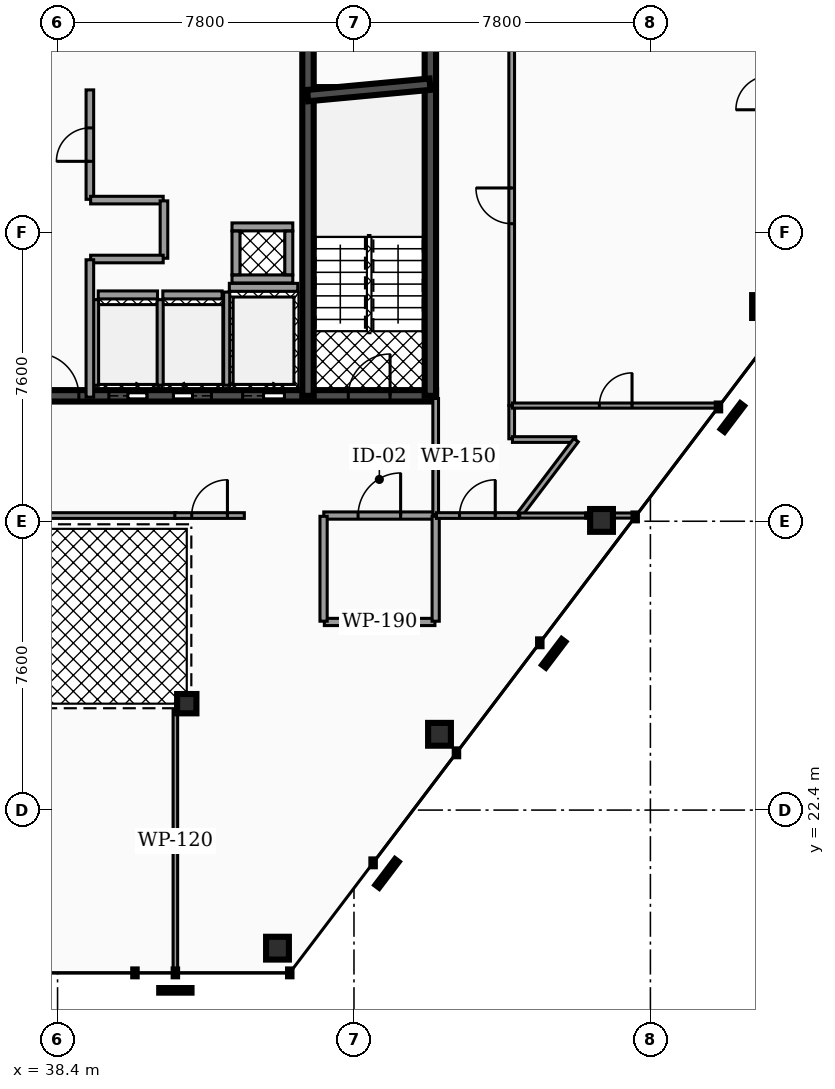
"""IFC4 building model, lengths in metres.
Left out: names, types, materials, properties, quantities, classifications, styles, units other than length and angle.
Written with IfcOpenShell. Run it as: python <this file> out.ifc"""

import sys

from ifc_helpers import new_model, si_unit, direction, frame, frame_2d, origin, origin_2d, place, context, subcontext, project, spatial, rectangle, hollow_rectangle, hollow_circle, extrude, element, fill, save


model = new_model("IFC4")
c1 = context("Model", 3, precision=1e-05, world=origin(), true_north=direction((0.0, 1.0)))
c2 = subcontext(c1, "Body", "Model", "MODEL_VIEW")
j1 = project(units=[si_unit("LENGTHUNIT", "METRE"), si_unit("PLANEANGLEUNIT", "RADIAN")], contexts=[c1])
p1 = place(None, origin())
s1 = spatial("IfcSite", under=j1, at=p1, CompositionType="ELEMENT")
p2 = place(p1, origin())
s2 = spatial("IfcBuilding", under=s1, at=p2, CompositionType="ELEMENT")
p3 = place(p2, frame((0.0, 0.0, 222.36)))
s3 = spatial("IfcBuildingStorey", under=s2, at=p3, CompositionType="ELEMENT", Elevation=222.36)
p4 = place(p3, frame((28.5, 33.3, 0.0), z_axis=(0.0, 0.0, 1.0), x_axis=(1.0, 0.0, 0.0)))
e1 = element("IfcWall", 1, at=p4, inside=s3, PredefinedType="SHEAR", context=c2, shape_type="SweptSolid", body=[
    extrude(rectangle(XDim=19.86, YDim=0.3, at=frame_2d((9.93, 0.0))), origin(), (0.0, 0.0, 1.0), 3.18),
])
p5 = place(p4, frame((3.93, 0.0, 0.0)))
e2 = element("IfcOpeningElement", 2, at=p5, cuts=e1, PredefinedType="OPENING", context=c2, shape_type="SweptSolid", body=[
    extrude(rectangle(XDim=1.1, YDim=2.15, at=frame_2d((0.55, 1.075))), frame((0.0, 0.16, 0.0), z_axis=(0.0, -1.0, 0.0), x_axis=(1.0, 0.0, 0.0)), (0.0, 0.0, 1.0), 0.32),
])
p6 = place(p4, frame((14.77, 0.0, 0.0)))
e3 = element("IfcOpeningElement", 3, at=p6, cuts=e1, PredefinedType="OPENING", context=c2, shape_type="SweptSolid", body=[
    extrude(rectangle(XDim=1.1, YDim=2.15, at=frame_2d((0.55, 1.075))), frame((0.0, 0.16, 0.0), z_axis=(0.0, -1.0, 0.0), x_axis=(1.0, 0.0, 0.0)), (0.0, 0.0, 1.0), 0.32),
])
p7 = place(p4, frame((11.25, 0.0, 0.0)))
e4 = element("IfcOpeningElement", 4, at=p7, cuts=e1, PredefinedType="OPENING", context=c2, shape_type="SweptSolid", body=[
    extrude(rectangle(XDim=1.0, YDim=2.1, at=frame_2d((0.5, 1.05))), frame((0.0, 0.16, 0.0), z_axis=(0.0, -1.0, 0.0), x_axis=(1.0, 0.0, 0.0)), (0.0, 0.0, 1.0), 0.32),
])
p8 = place(p4, frame((12.95, 0.0, 0.0)))
e5 = element("IfcOpeningElement", 5, at=p8, cuts=e1, PredefinedType="OPENING", context=c2, shape_type="SweptSolid", body=[
    extrude(rectangle(XDim=1.0, YDim=2.1, at=frame_2d((0.5, 1.05))), frame((0.0, 0.16, 0.0), z_axis=(0.0, -1.0, 0.0), x_axis=(1.0, 0.0, 0.0)), (0.0, 0.0, 1.0), 0.32),
])
p9 = place(p4, frame((5.85, 0.0, 0.0)))
e6 = element("IfcOpeningElement", 6, at=p9, cuts=e1, PredefinedType="OPENING", context=c2, shape_type="SweptSolid", body=[
    extrude(rectangle(XDim=1.0, YDim=2.1, at=frame_2d((0.5, 1.05))), frame((0.0, 0.16, 0.0), z_axis=(0.0, -1.0, 0.0), x_axis=(1.0, 0.0, 0.0)), (0.0, 0.0, 1.0), 0.32),
])
p10 = place(p4, frame((1.21, 0.0, 0.0)))
e7 = element("IfcOpeningElement", 7, at=p10, cuts=e1, PredefinedType="OPENING", context=c2, shape_type="SweptSolid", body=[
    extrude(rectangle(XDim=1.1, YDim=2.2, at=frame_2d((0.55, 1.1))), frame((0.0, 0.16, 0.0), z_axis=(0.0, -1.0, 0.0), x_axis=(1.0, 0.0, 0.0)), (0.0, 0.0, 1.0), 0.32),
])
p11 = place(p4, frame((9.34, 0.0, 0.0)))
e8 = element("IfcOpeningElement", 8, at=p11, cuts=e1, PredefinedType="OPENING", context=c2, shape_type="SweptSolid", body=[
    extrude(rectangle(XDim=1.12, YDim=2.05, at=frame_2d((0.56, 1.025))), frame((0.0, 0.16, 0.0), z_axis=(0.0, -1.0, 0.0), x_axis=(1.0, 0.0, 0.0)), (0.0, 0.0, 1.0), 0.32),
])
p12 = place(p4, frame((17.55, 0.0, 0.0)))
e9 = element("IfcOpeningElement", 9, at=p12, cuts=e1, PredefinedType="OPENING", context=c2, shape_type="SweptSolid", body=[
    extrude(rectangle(XDim=1.1, YDim=2.2, at=frame_2d((0.55, 1.1))), frame((0.0, 0.16, 0.0), z_axis=(0.0, -1.0, 0.0), x_axis=(1.0, 0.0, 0.0)), (0.0, 0.0, 1.0), 0.32),
])
for number, where, z_axis, x_axis in (
    (10, (44.99, 33.3, 0.0), (0.0, 0.0, 1.0), (0.0, 1.0, 0.0)),
    (11, (48.21, 33.3, 0.0), (0.0, 0.0, 1.0), (0.0, 1.0, 0.0)),
):
    element("IfcWall", number, at=place(p3, frame(where, z_axis=z_axis, x_axis=x_axis)), inside=s3, PredefinedType="SHEAR", context=c2, shape_type="SweptSolid", body=[
        extrude(rectangle(XDim=10.1, YDim=0.3, at=frame_2d((5.05, 0.0))), origin(), (0.0, 0.0, 1.0), 3.18),
    ])
p13 = place(p3, frame((44.98, 41.2, 0.0), z_axis=(0.0, 0.0, 1.0), x_axis=(0.995686468965, 0.09278176286, 0.0)))
e12 = element("IfcWall", 12, at=p13, inside=s3, PredefinedType="SHEAR", context=c2, shape_type="SweptSolid", body=[
    extrude(rectangle(XDim=3.234, YDim=0.3, at=frame_2d((1.617, 0.0))), origin(), (0.0, 0.0, 1.0), 3.18),
])
for number, where, z_axis, x_axis in (
    (13, (44.187, 18.767, 0.0), (0.0, 0.0, 1.0), (1.0, 0.0, 0.0)),
    (14, (48.45, 24.394, 0.0), (0.0, 0.0, 1.0), (1.0, 0.0, 0.0)),
    (15, (52.714, 30.022, 0.0), (0.0, 0.0, 1.0), (1.0, 0.0, 0.0)),
    (16, (56.977, 35.649, 0.0), (0.0, 0.0, 1.0), (1.0, 0.0, 0.0)),
):
    element("IfcColumn", number, at=place(p3, frame(where, z_axis=z_axis, x_axis=x_axis)), inside=s3, PredefinedType="COLUMN", context=c2, shape_type="SweptSolid", body=[
        extrude(hollow_rectangle(XDim=0.6, YDim=0.6, WallThickness=0.03, at=origin_2d()), origin(), (0.0, 0.0, 1.0), 3.18),
    ])
p14 = place(p3, frame((41.8, 25.2, 0.0), z_axis=(0.0, 0.0, 1.0), x_axis=(1.0, 0.0, 0.0)))
e17 = element("IfcColumn", 17, at=p14, inside=s3, PredefinedType="COLUMN", context=c2, shape_type="SweptSolid", body=[
    extrude(hollow_circle(Radius=0.254, WallThickness=0.02, at=origin_2d()), origin(), (0.0, 0.0, 1.0), 3.18),
])
p15 = place(p3, frame((42.92, 36.155, 0.0), z_axis=(0.0, 0.0, 1.0), x_axis=(1.0, 0.0, 0.0)))
e18 = element("IfcWall", 18, at=p15, inside=s3, PredefinedType="SOLIDWALL", context=c2, shape_type="SweptSolid", body=[
    extrude(rectangle(XDim=1.8, YDim=0.21, at=frame_2d((0.9, 0.0))), origin(), (0.0, 0.0, 1.0), 3.18),
])
p16 = place(p3, frame((42.85, 33.58, 0.0), z_axis=(0.0, 0.0, 1.0), x_axis=(0.0, 1.0, 0.0)))
e19 = element("IfcWall", 19, at=p16, inside=s3, PredefinedType="SOLIDWALL", context=c2, shape_type="SweptSolid", body=[
    extrude(rectangle(XDim=2.45, YDim=0.16, at=frame_2d((1.225, 0.0))), origin(), (0.0, 0.0, 1.0), 3.18),
])
p17 = place(p3, frame((39.47, 35.955, 0.0), z_axis=(0.0, 0.0, 1.0), x_axis=(1.0, 0.0, 0.0)))
e20 = element("IfcWall", 20, at=p17, inside=s3, PredefinedType="SOLIDWALL", context=c2, shape_type="SweptSolid", body=[
    extrude(rectangle(XDim=1.56, YDim=0.21, at=frame_2d((0.78, 0.0))), origin(), (0.0, 0.0, 1.0), 3.18),
])
for number, where, z_axis, x_axis in (
    (21, (39.4, 33.58, 0.0), (0.0, 0.0, 1.0), (0.0, 1.0, 0.0)),
    (22, (41.1, 33.58, 0.0), (0.0, 0.0, 1.0), (0.0, 1.0, 0.0)),
):
    element("IfcWall", number, at=place(p3, frame(where, z_axis=z_axis, x_axis=x_axis)), inside=s3, PredefinedType="SOLIDWALL", context=c2, shape_type="SweptSolid", body=[
        extrude(rectangle(XDim=2.25, YDim=0.16, at=frame_2d((1.125, 0.0))), origin(), (0.0, 0.0, 1.0), 3.18),
    ])
p18 = place(p3, frame((41.17, 35.955, 0.0), z_axis=(0.0, 0.0, 1.0), x_axis=(1.0, 0.0, 0.0)))
e23 = element("IfcWall", 23, at=p18, inside=s3, PredefinedType="SOLIDWALL", context=c2, shape_type="SweptSolid", body=[
    extrude(rectangle(XDim=1.56, YDim=0.21, at=frame_2d((0.78, 0.0))), origin(), (0.0, 0.0, 1.0), 3.18),
])
for number, where, z_axis, x_axis in (
    (24, (42.99, 36.375, 0.0), (0.0, 0.0, 1.0), (1.0, 0.0, 0.0)),
    (25, (42.99, 37.745, 0.0), (0.0, 0.0, 1.0), (1.0, 0.0, 0.0)),
):
    element("IfcWall", number, at=place(p3, frame(where, z_axis=z_axis, x_axis=x_axis)), inside=s3, PredefinedType="SOLIDWALL", context=c2, shape_type="SweptSolid", body=[
        extrude(rectangle(XDim=1.6, YDim=0.21, at=frame_2d((0.8, 0.0))), origin(), (0.0, 0.0, 1.0), 3.18),
    ])
for number, where, z_axis, x_axis in (
    (26, (43.095, 36.485, 0.0), (0.0, 0.0, 1.0), (0.0, 1.0, 0.0)),
    (27, (44.485, 36.485, 0.0), (0.0, 0.0, 1.0), (0.0, 1.0, 0.0)),
):
    element("IfcWall", number, at=place(p3, frame(where, z_axis=z_axis, x_axis=x_axis)), inside=s3, PredefinedType="SOLIDWALL", context=c2, shape_type="SweptSolid", body=[
        extrude(rectangle(XDim=1.15, YDim=0.21, at=frame_2d((0.575, 0.0))), origin(), (0.0, 0.0, 1.0), 3.18),
    ])
p19 = place(p3, frame((39.25, 38.47, 0.0), z_axis=(0.0, 0.0, 1.0), x_axis=(0.0, 1.0, 0.0)))
e28 = element("IfcWall", 28, at=p19, inside=s3, PredefinedType="PARTITIONING", context=c2, shape_type="SweptSolid", body=[
    extrude(rectangle(XDim=2.88, YDim=0.2, at=frame_2d((1.44, 0.0))), origin(), (0.0, 0.0, 1.0), 2.235),
])
p20 = place(p19, frame((1.0, 0.0, 0.0)))
e29 = element("IfcOpeningElement", 29, at=p20, cuts=e28, PredefinedType="OPENING", context=c2, shape_type="SweptSolid", body=[
    extrude(rectangle(XDim=0.88, YDim=2.05, at=frame_2d((0.44, 1.025))), frame((0.0, 0.11, 0.0), z_axis=(0.0, -1.0, 0.0), x_axis=(1.0, 0.0, 0.0)), (0.0, 0.0, 1.0), 0.22),
])
p21 = place(p3, frame((39.27, 38.45, 0.0), z_axis=(0.0, 0.0, 1.0), x_axis=(1.0, 0.0, 0.0)))
e30 = element("IfcWall", 30, at=p21, inside=s3, PredefinedType="PARTITIONING", context=c2, shape_type="SweptSolid", body=[
    extrude(rectangle(XDim=1.91, YDim=0.2, at=frame_2d((0.955, 0.0))), origin(), (0.0, 0.0, 1.0), 2.235),
])
p22 = place(p3, frame((41.2, 36.92, 0.0), z_axis=(0.0, 0.0, 1.0), x_axis=(0.0, 1.0, 0.0)))
e31 = element("IfcWall", 31, at=p22, inside=s3, PredefinedType="PARTITIONING", context=c2, shape_type="SweptSolid", body=[
    extrude(rectangle(XDim=1.51, YDim=0.2, at=frame_2d((0.755, 0.0))), origin(), (0.0, 0.0, 1.0), 2.235),
])
p23 = place(p3, frame((39.27, 36.9, 0.0), z_axis=(0.0, 0.0, 1.0), x_axis=(1.0, 0.0, 0.0)))
e32 = element("IfcWall", 32, at=p23, inside=s3, PredefinedType="PARTITIONING", context=c2, shape_type="SweptSolid", body=[
    extrude(rectangle(XDim=1.91, YDim=0.2, at=frame_2d((0.955, 0.0))), origin(), (0.0, 0.0, 1.0), 2.235),
])
p24 = place(p3, frame((39.25, 33.265, 0.0), z_axis=(0.0, 0.0, 1.0), x_axis=(0.0, 1.0, 0.0)))
e33 = element("IfcWall", 33, at=p24, inside=s3, PredefinedType="PARTITIONING", context=c2, shape_type="SweptSolid", body=[
    extrude(rectangle(XDim=3.615, YDim=0.2, at=frame_2d((1.808, 0.0))), origin(), (0.0, 0.0, 1.0), 2.235),
])
p25 = place(p3, frame((45.405, 30.15, 0.0), z_axis=(0.0, 0.0, 1.0), x_axis=(1.0, 0.0, 0.0)))
e34 = element("IfcWall", 34, at=p25, inside=s3, PredefinedType="PARTITIONING", context=c2, shape_type="SweptSolid", body=[
    extrude(rectangle(XDim=2.925, YDim=0.19, at=frame_2d((1.462, 0.0))), origin(), (0.0, 0.0, 1.0), 2.235),
])
p26 = place(p25, frame((0.903, 0.0, 0.0)))
e35 = element("IfcOpeningElement", 35, at=p26, cuts=e34, PredefinedType="OPENING", context=c2, shape_type="SweptSolid", body=[
    extrude(rectangle(XDim=1.12, YDim=2.05, at=frame_2d((0.56, 1.025))), frame((0.0, 0.105, 0.0), z_axis=(0.0, -1.0, 0.0), x_axis=(1.0, 0.0, 0.0)), (0.0, 0.0, 1.0), 0.21),
])
p27 = place(p3, frame((48.35, 30.17, 0.0), z_axis=(0.0, 0.0, 1.0), x_axis=(0.0, 1.0, 0.0)))
e36 = element("IfcWall", 36, at=p27, inside=s3, PredefinedType="PARTITIONING", context=c2, shape_type="SweptSolid", body=[
    extrude(rectangle(XDim=3.06, YDim=0.15, at=frame_2d((1.53, 0.0))), origin(), (0.0, 0.0, 1.0), 2.235),
])
p28 = place(p3, frame((33.485, 30.15, 0.0), z_axis=(0.0, 0.0, 1.0), x_axis=(1.0, 0.0, 0.0)))
e37 = element("IfcWall", 37, at=p28, inside=s3, PredefinedType="PARTITIONING", context=c2, shape_type="SweptSolid", body=[
    extrude(rectangle(XDim=8.03, YDim=0.15, at=frame_2d((4.015, 0.0))), origin(), (0.0, 0.0, 1.0), 2.235),
])
p29 = place(p28, frame((0.345, 0.0, 0.0)))
e38 = element("IfcOpeningElement", 38, at=p29, cuts=e37, PredefinedType="OPENING", context=c2, shape_type="SweptSolid", body=[
    extrude(rectangle(XDim=0.94, YDim=2.05, at=frame_2d((0.47, 1.025))), frame((0.0, 0.085, 0.0), z_axis=(0.0, -1.0, 0.0), x_axis=(1.0, 0.0, 0.0)), (0.0, 0.0, 1.0), 0.17),
])
p30 = place(p3, frame((41.485, 30.15, 0.0), z_axis=(0.0, 0.0, 1.0), x_axis=(1.0, 0.0, 0.0)))
e39 = element("IfcWall", 39, at=p30, inside=s3, PredefinedType="PARTITIONING", context=c2, shape_type="SweptSolid", body=[
    extrude(rectangle(XDim=1.83, YDim=0.15, at=frame_2d((0.915, 0.0))), origin(), (0.0, 0.0, 1.0), 2.235),
])
p31 = place(p30, frame((0.445, 0.0, 0.0)))
e40 = element("IfcOpeningElement", 40, at=p31, cuts=e39, PredefinedType="OPENING", context=c2, shape_type="SweptSolid", body=[
    extrude(rectangle(XDim=0.94, YDim=2.05, at=frame_2d((0.47, 1.025))), frame((0.0, 0.085, 0.0), z_axis=(0.0, -1.0, 0.0), x_axis=(1.0, 0.0, 0.0)), (0.0, 0.0, 1.0), 0.17),
])
p32 = place(p3, frame((45.42, 27.35, 0.0), z_axis=(0.0, 0.0, 1.0), x_axis=(1.0, 0.0, 0.0)))
e41 = element("IfcWall", 41, at=p32, inside=s3, PredefinedType="PARTITIONING", context=c2, shape_type="SweptSolid", body=[
    extrude(rectangle(XDim=2.91, YDim=0.19, at=frame_2d((1.455, 0.0))), origin(), (0.0, 0.0, 1.0), 2.235),
])
for number, where, z_axis, x_axis in (
    (42, (45.4, 27.37, 0.0), (0.0, 0.0, 1.0), (0.0, 1.0, 0.0)),
    (43, (48.35, 27.37, 0.0), (0.0, 0.0, 1.0), (0.0, 1.0, 0.0)),
):
    element("IfcWall", number, at=place(p3, frame(where, z_axis=z_axis, x_axis=x_axis)), inside=s3, PredefinedType="PARTITIONING", context=c2, shape_type="SweptSolid", body=[
        extrude(rectangle(XDim=2.76, YDim=0.19, at=frame_2d((1.38, 0.0))), origin(), (0.0, 0.0, 1.0), 2.235),
    ])
p33 = place(p3, frame((48.37, 30.15, 0.0), z_axis=(0.0, 0.0, 1.0), x_axis=(1.0, 0.0, 0.0)))
e44 = element("IfcWall", 44, at=p33, inside=s3, PredefinedType="PARTITIONING", context=c2, shape_type="SweptSolid", body=[
    extrude(rectangle(XDim=2.155, YDim=0.15, at=frame_2d((1.078, 0.0))), origin(), (0.0, 0.0, 1.0), 2.235),
])
p34 = place(p33, frame((0.608, 0.0, 0.0)))
e45 = element("IfcOpeningElement", 45, at=p34, cuts=e44, PredefinedType="OPENING", context=c2, shape_type="SweptSolid", body=[
    extrude(rectangle(XDim=0.94, YDim=2.05, at=frame_2d((0.47, 1.025))), frame((0.0, 0.085, 0.0), z_axis=(0.0, -1.0, 0.0), x_axis=(1.0, 0.0, 0.0)), (0.0, 0.0, 1.0), 0.17),
])
p35 = place(p3, frame((50.35, 33.049, 0.0), z_axis=(0.0, 0.0, 1.0), x_axis=(0.0, 1.0, 0.0)))
e46 = element("IfcWall", 46, at=p35, inside=s3, PredefinedType="PARTITIONING", context=c2, shape_type="SweptSolid", body=[
    extrude(rectangle(XDim=10.501, YDim=0.15, at=frame_2d((5.251, 0.0))), origin(), (0.0, 0.0, 1.0), 2.235),
])
p36 = place(p35, frame((4.781, 0.0, 0.0)))
e47 = element("IfcOpeningElement", 47, at=p36, cuts=e46, PredefinedType="OPENING", context=c2, shape_type="SweptSolid", body=[
    extrude(rectangle(XDim=0.94, YDim=2.05, at=frame_2d((0.47, 1.025))), frame((0.0, 0.085, 0.0), z_axis=(0.0, -1.0, 0.0), x_axis=(1.0, 0.0, 0.0)), (0.0, 0.0, 1.0), 0.17),
])
p37 = place(p3, frame((50.35, 32.17, 0.0), z_axis=(0.0, 0.0, 1.0), x_axis=(0.0, 1.0, 0.0)))
e48 = element("IfcWall", 48, at=p37, inside=s3, PredefinedType="PARTITIONING", context=c2, shape_type="SweptSolid", body=[
    extrude(rectangle(XDim=0.869, YDim=0.15, at=frame_2d((0.434, 0.0))), origin(), (0.0, 0.0, 1.0), 2.235),
])
p38 = place(p3, frame((50.37, 32.15, 0.0), z_axis=(0.0, 0.0, 1.0), x_axis=(1.0, 0.0, 0.0)))
e49 = element("IfcWall", 49, at=p38, inside=s3, PredefinedType="PARTITIONING", context=c2, shape_type="SweptSolid", body=[
    extrude(rectangle(XDim=1.665, YDim=0.15, at=frame_2d((0.833, 0.0))), origin(), (0.0, 0.0, 1.0), 2.235),
])
p39 = place(p3, frame((50.552, 30.166, 0.0), z_axis=(0.0, 0.0, 1.0), x_axis=(0.603869110647, 0.797083494502, 0.0)))
e50 = element("IfcWall", 50, at=p39, inside=s3, PredefinedType="PARTITIONING", context=c2, shape_type="SweptSolid", body=[
    extrude(rectangle(XDim=2.469, YDim=0.15, at=frame_2d((1.234, 0.0))), origin(), (0.0, 0.0, 1.0), 2.235),
])
p40 = place(p3, frame((41.5, 18.132, 0.0), z_axis=(0.0, 0.0, 1.0), x_axis=(0.0, 1.0, 0.0)))
e51 = element("IfcWall", 51, at=p40, inside=s3, PredefinedType="PARTITIONING", context=c2, shape_type="SweptSolid", body=[
    extrude(rectangle(XDim=6.888, YDim=0.12, at=frame_2d((3.444, 0.0))), origin(), (0.0, 0.0, 1.0), 2.235),
])
p41 = place(p3, frame((50.56, 30.15, 0.0), z_axis=(0.0, 0.0, 1.0), x_axis=(1.0, 0.0, 0.0)))
e52 = element("IfcWall", 52, at=p41, inside=s3, PredefinedType="PARTITIONING", context=c2, shape_type="SweptSolid", body=[
    extrude(rectangle(XDim=1.74, YDim=0.135, at=frame_2d((0.87, 0.0))), origin(), (0.0, 0.0, 1.0), 2.235),
])
p42 = place(p3, frame((52.3, 30.15, 0.0), z_axis=(0.0, 0.0, 1.0), x_axis=(1.0, 0.0, 0.0)))
e53 = element("IfcWall", 53, at=p42, inside=s3, PredefinedType="PARTITIONING", context=c2, shape_type="SweptSolid", body=[
    extrude(rectangle(XDim=1.311, YDim=0.135, at=frame_2d((0.656, 0.0))), origin(), (0.0, 0.0, 1.0), 2.235),
])
p43 = place(p3, frame((50.37, 33.043, 0.0), z_axis=(0.0, 0.0, 1.0), x_axis=(1.0, 0.0, 0.0)))
e54 = element("IfcWall", 54, at=p43, inside=s3, PredefinedType="PARTITIONING", context=c2, shape_type="SweptSolid", body=[
    extrude(rectangle(XDim=5.433, YDim=0.135, at=frame_2d((2.717, 0.0))), origin(), (0.0, 0.0, 1.0), 2.235),
])
p44 = place(p43, frame((2.287, 0.0, 0.0)))
e55 = element("IfcOpeningElement", 55, at=p44, cuts=e54, PredefinedType="OPENING", context=c2, shape_type="SweptSolid", body=[
    extrude(rectangle(XDim=0.86, YDim=2.05, at=frame_2d((0.43, 1.025))), frame((0.0, 0.077, 0.0), z_axis=(0.0, -1.0, 0.0), x_axis=(1.0, 0.0, 0.0)), (0.0, 0.0, 1.0), 0.155),
])
p45 = place(p6, origin())
e56 = element("IfcDoor", 56, at=p45, inside=s3, OperationType="SLIDING_TO_RIGHT", PredefinedType="DOOR", context=c2, shape_type="SweptSolid", body=[
    extrude(rectangle(XDim=1.1, YDim=2.15, at=frame_2d((0.55, 1.075))), frame((0.0, 0.025, 0.0), z_axis=(0.0, -1.0, 0.0), x_axis=(1.0, 0.0, 0.0)), (0.0, 0.0, 1.0), 0.05),
])
fill(e3, e56)
p46 = place(p7, origin())
e57 = element("IfcDoor", 57, at=p46, inside=s3, OperationType="SLIDING_TO_RIGHT", PredefinedType="DOOR", context=c2, shape_type="SweptSolid", body=[
    extrude(rectangle(XDim=1.0, YDim=2.1, at=frame_2d((0.5, 1.05))), frame((0.0, 0.025, 0.0), z_axis=(0.0, -1.0, 0.0), x_axis=(1.0, 0.0, 0.0)), (0.0, 0.0, 1.0), 0.05),
])
fill(e4, e57)
p47 = place(p8, origin())
e58 = element("IfcDoor", 58, at=p47, inside=s3, OperationType="SLIDING_TO_LEFT", PredefinedType="DOOR", context=c2, shape_type="SweptSolid", body=[
    extrude(rectangle(XDim=1.0, YDim=2.1, at=frame_2d((0.5, 1.05))), frame((0.0, 0.025, 0.0), z_axis=(0.0, -1.0, 0.0), x_axis=(1.0, 0.0, 0.0)), (0.0, 0.0, 1.0), 0.05),
])
fill(e5, e58)
p48 = place(p11, origin())
e59 = element("IfcDoor", 59, at=p48, inside=s3, OperationType="SINGLE_SWING_LEFT", PredefinedType="DOOR", context=c2, shape_type="SweptSolid", body=[
    extrude(rectangle(XDim=1.12, YDim=2.05, at=frame_2d((0.56, 1.025))), frame((0.0, 0.025, 0.0), z_axis=(0.0, -1.0, 0.0), x_axis=(1.0, 0.0, 0.0)), (0.0, 0.0, 1.0), 0.05),
])
fill(e8, e59)
p49 = place(p12, origin())
e60 = element("IfcDoor", 60, at=p49, inside=s3, OperationType="SINGLE_SWING_RIGHT", PredefinedType="DOOR", context=c2, shape_type="SweptSolid", body=[
    extrude(rectangle(XDim=1.1, YDim=2.2, at=frame_2d((0.55, 1.1))), frame((0.0, 0.025, 0.0), z_axis=(0.0, -1.0, 0.0), x_axis=(1.0, 0.0, 0.0)), (0.0, 0.0, 1.0), 0.05),
])
fill(e9, e60)
p50 = place(p20, origin())
e61 = element("IfcDoor", 61, at=p50, inside=s3, OperationType="SINGLE_SWING_LEFT", PredefinedType="DOOR", context=c2, shape_type="SweptSolid", body=[
    extrude(rectangle(XDim=0.88, YDim=2.05, at=frame_2d((0.44, 1.025))), frame((0.0, 0.025, 0.0), z_axis=(0.0, -1.0, 0.0), x_axis=(1.0, 0.0, 0.0)), (0.0, 0.0, 1.0), 0.05),
])
fill(e29, e61)
p51 = place(p26, origin())
e62 = element("IfcDoor", 62, at=p51, inside=s3, OperationType="SINGLE_SWING_RIGHT", PredefinedType="DOOR", context=c2, shape_type="SweptSolid", body=[
    extrude(rectangle(XDim=1.12, YDim=2.05, at=frame_2d((0.56, 1.025))), frame((0.0, 0.025, 0.0), z_axis=(0.0, -1.0, 0.0), x_axis=(1.0, 0.0, 0.0)), (0.0, 0.0, 1.0), 0.05),
])
fill(e35, e62)
p52 = place(p31, origin())
e63 = element("IfcDoor", 63, at=p52, inside=s3, OperationType="SINGLE_SWING_RIGHT", PredefinedType="DOOR", context=c2, shape_type="SweptSolid", body=[
    extrude(rectangle(XDim=0.94, YDim=2.05, at=frame_2d((0.47, 1.025))), frame((0.0, 0.025, 0.0), z_axis=(0.0, -1.0, 0.0), x_axis=(1.0, 0.0, 0.0)), (0.0, 0.0, 1.0), 0.05),
])
fill(e40, e63)
p53 = place(p34, origin())
e64 = element("IfcDoor", 64, at=p53, inside=s3, OperationType="SINGLE_SWING_RIGHT", PredefinedType="DOOR", context=c2, shape_type="SweptSolid", body=[
    extrude(rectangle(XDim=0.94, YDim=2.05, at=frame_2d((0.47, 1.025))), frame((0.0, 0.025, 0.0), z_axis=(0.0, -1.0, 0.0), x_axis=(1.0, 0.0, 0.0)), (0.0, 0.0, 1.0), 0.05),
])
fill(e45, e64)
p54 = place(p36, origin())
e65 = element("IfcDoor", 65, at=p54, inside=s3, OperationType="SINGLE_SWING_RIGHT", PredefinedType="DOOR", context=c2, shape_type="SweptSolid", body=[
    extrude(rectangle(XDim=0.94, YDim=2.05, at=frame_2d((0.47, 1.025))), frame((0.0, 0.025, 0.0), z_axis=(0.0, -1.0, 0.0), x_axis=(1.0, 0.0, 0.0)), (0.0, 0.0, 1.0), 0.05),
])
fill(e47, e65)
p55 = place(p44, origin())
e66 = element("IfcDoor", 66, at=p55, inside=s3, OperationType="SINGLE_SWING_RIGHT", PredefinedType="DOOR", context=c2, shape_type="SweptSolid", body=[
    extrude(rectangle(XDim=0.86, YDim=2.05, at=frame_2d((0.43, 1.025))), frame((0.0, 0.025, 0.0), z_axis=(0.0, -1.0, 0.0), x_axis=(1.0, 0.0, 0.0)), (0.0, 0.0, 1.0), 0.05),
])
fill(e55, e66)
save(model, sys.argv[1])
